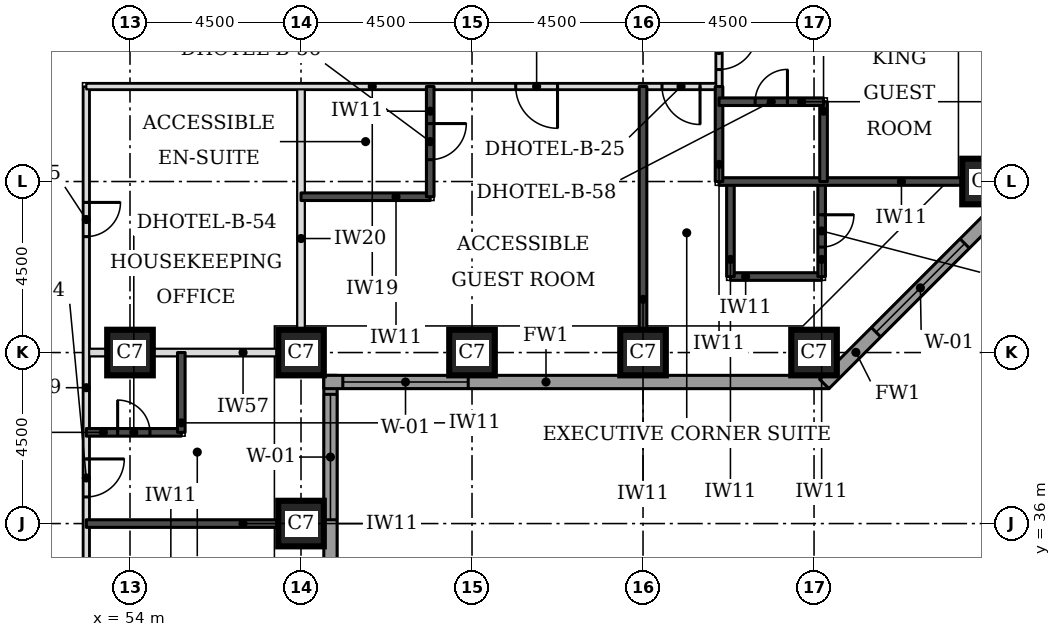
"""IFC4 building model, lengths in metres.
Left out: names, types, materials, properties, quantities, classifications, styles, units other than length and angle.
Written with IfcOpenShell. Run it as: python <this file> out.ifc"""

import sys

from ifc_helpers import new_model, si_unit, direction, frame, frame_2d, origin, origin_2d, place, context, subcontext, project, spatial, rectangle, extrude, element, fill, save


model = new_model("IFC4")
c1 = context("Model", 3, precision=1e-05, world=origin(), true_north=direction((0.0, 1.0)))
c2 = subcontext(c1, "Body", "Model", "MODEL_VIEW")
j1 = project(units=[si_unit("LENGTHUNIT", "METRE"), si_unit("PLANEANGLEUNIT", "RADIAN")], contexts=[c1])
p1 = place(None, origin())
s1 = spatial("IfcSite", under=j1, at=p1, CompositionType="ELEMENT")
p2 = place(p1, origin())
s2 = spatial("IfcBuilding", under=s1, at=p2, CompositionType="ELEMENT")
p3 = place(p2, frame((0.0, 0.0, 29.7)))
s3 = spatial("IfcBuildingStorey", under=s2, at=p3, CompositionType="ELEMENT", Elevation=29.7)
for number, where, z_axis, x_axis in (
    (1, (58.5, 36.0, 0.0), (0.0, 0.0, 1.0), (1.0, 0.0, 0.0)),
    (2, (54.0, 40.5, 0.0), (0.0, 0.0, 1.0), (1.0, 0.0, 0.0)),
    (3, (58.5, 40.5, 0.0), (0.0, 0.0, 1.0), (1.0, 0.0, 0.0)),
    (4, (63.0, 40.5, 0.0), (0.0, 0.0, 1.0), (1.0, 0.0, 0.0)),
    (5, (67.5, 40.5, 0.0), (0.0, 0.0, 1.0), (1.0, 0.0, 0.0)),
    (6, (72.0, 40.5, 0.0), (0.0, 0.0, 1.0), (1.0, 0.0, 0.0)),
    (7, (76.5, 45.0, 0.0), (0.0, 0.0, 1.0), (1.0, 0.0, 0.0)),
):
    element("IfcColumn", number, at=place(p3, frame(where, z_axis=z_axis, x_axis=x_axis)), inside=s3, PredefinedType="COLUMN", context=c2, shape_type="SweptSolid", body=[
        extrude(rectangle(XDim=1.2, YDim=1.2, at=origin_2d()), origin(), (0.0, 0.0, 1.0), 3.3),
    ])
p4 = place(p3, frame((59.275, 22.106, 0.0), z_axis=(0.0, 0.0, 1.0), x_axis=(0.0, 1.0, 0.0)))
e8 = element("IfcWall", 8, at=p4, inside=s3, PredefinedType="STANDARD", context=c2, shape_type="SweptSolid", body=[
    extrude(rectangle(XDim=17.793, YDim=0.35, at=frame_2d((8.897, 0.0))), origin(), (0.0, 0.0, 1.0), 3.055),
])
p5 = place(p4, frame((5.493, 0.0, 0.8)))
e9 = element("IfcOpeningElement", 9, at=p5, cuts=e8, PredefinedType="OPENING", context=c2, shape_type="SweptSolid", body=[
    extrude(rectangle(XDim=3.3, YDim=1.5, at=frame_2d((1.65, 0.75))), frame((0.0, 0.185, 0.0), z_axis=(0.0, -1.0, 0.0), x_axis=(1.0, 0.0, 0.0)), (0.0, 0.0, 1.0), 0.37),
])
p6 = place(p4, frame((13.993, 0.0, 0.8)))
e10 = element("IfcOpeningElement", 10, at=p6, cuts=e8, PredefinedType="OPENING", context=c2, shape_type="SweptSolid", body=[
    extrude(rectangle(XDim=3.3, YDim=1.5, at=frame_2d((1.65, 0.75))), frame((0.0, 0.185, 0.0), z_axis=(0.0, -1.0, 0.0), x_axis=(1.0, 0.0, 0.0)), (0.0, 0.0, 1.0), 0.37),
])
p7 = place(p3, frame((59.1, 39.725, 0.0), z_axis=(0.0, 0.0, 1.0), x_axis=(1.0, 0.0, 0.0)))
e11 = element("IfcWall", 11, at=p7, inside=s3, PredefinedType="STANDARD", context=c2, shape_type="SweptSolid", body=[
    extrude(rectangle(XDim=13.293, YDim=0.35, at=frame_2d((6.647, 0.0))), origin(), (0.0, 0.0, 1.0), 3.055),
])
p8 = place(p7, frame((0.5, 0.0, 0.8)))
e12 = element("IfcOpeningElement", 12, at=p8, cuts=e11, PredefinedType="OPENING", context=c2, shape_type="SweptSolid", body=[
    extrude(rectangle(XDim=3.3, YDim=1.5, at=frame_2d((1.65, 0.75))), frame((0.0, 0.185, 0.0), z_axis=(0.0, -1.0, 0.0), x_axis=(1.0, 0.0, 0.0)), (0.0, 0.0, 1.0), 0.37),
])
p9 = place(p3, frame((72.27, 39.674, 0.0), z_axis=(0.0, 0.0, 1.0), x_axis=(0.707106781187, 0.707106781187, 0.0)))
e13 = element("IfcWall", 13, at=p9, inside=s3, PredefinedType="STANDARD", context=c2, shape_type="SweptSolid", body=[
    extrude(rectangle(XDim=7.151, YDim=0.35, at=frame_2d((3.576, 0.0))), origin(), (0.0, 0.0, 1.0), 3.055),
])
p10 = place(p9, frame((1.926, 0.0, 0.8)))
e14 = element("IfcOpeningElement", 14, at=p10, cuts=e13, PredefinedType="OPENING", context=c2, shape_type="SweptSolid", body=[
    extrude(rectangle(XDim=3.3, YDim=1.5, at=frame_2d((1.65, 0.75))), frame((0.0, 0.185, 0.0), z_axis=(0.0, -1.0, 0.0), x_axis=(1.0, 0.0, 0.0)), (0.0, 0.0, 1.0), 0.37),
])
p11 = place(p3, frame((52.85, 40.5, 0.0), z_axis=(0.0, 0.0, 1.0), x_axis=(1.0, 0.0, 0.0)))
e15 = element("IfcWall", 15, at=p11, inside=s3, PredefinedType="PARTITIONING", context=c2, shape_type="SweptSolid", body=[
    extrude(rectangle(XDim=5.05, YDim=0.2, at=frame_2d((2.525, 0.0))), origin(), (0.0, 0.0, 1.0), 2.33),
])
p12 = place(p3, frame((58.5, 41.1, 0.0), z_axis=(0.0, 0.0, 1.0), x_axis=(0.0, 1.0, 0.0)))
e16 = element("IfcWall", 16, at=p12, inside=s3, PredefinedType="PARTITIONING", context=c2, shape_type="SweptSolid", body=[
    extrude(rectangle(XDim=6.4, YDim=0.2, at=frame_2d((3.2, 0.0))), origin(), (0.0, 0.0, 1.0), 3.08),
])
p13 = place(p3, frame((52.85, 23.65, 0.0), z_axis=(0.0, 0.0, 1.0), x_axis=(0.0, 1.0, 0.0)))
e17 = element("IfcWall", 17, at=p13, inside=s3, PredefinedType="PARTITIONING", context=c2, shape_type="SweptSolid", body=[
    extrude(rectangle(XDim=23.85, YDim=0.15, at=frame_2d((11.925, 0.0))), origin(), (0.0, 0.0, 1.0), 3.08),
])
p14 = place(p13, frame((1.65, 0.0, 0.0)))
e18 = element("IfcOpeningElement", 18, at=p14, cuts=e17, PredefinedType="OPENING", context=c2, shape_type="SweptSolid", body=[
    extrude(rectangle(XDim=1.0, YDim=2.1, at=frame_2d((0.5, 1.05))), frame((0.0, 0.085, 0.0), z_axis=(0.0, -1.0, 0.0), x_axis=(1.0, 0.0, 0.0)), (0.0, 0.0, 1.0), 0.17),
])
p15 = place(p13, frame((8.95, 0.0, 0.0)))
e19 = element("IfcOpeningElement", 19, at=p15, cuts=e17, PredefinedType="OPENING", context=c2, shape_type="SweptSolid", body=[
    extrude(rectangle(XDim=1.0, YDim=2.1, at=frame_2d((0.5, 1.05))), frame((0.0, 0.085, 0.0), z_axis=(0.0, -1.0, 0.0), x_axis=(1.0, 0.0, 0.0)), (0.0, 0.0, 1.0), 0.17),
])
p16 = place(p13, frame((13.05, 0.0, 0.0)))
e20 = element("IfcOpeningElement", 20, at=p16, cuts=e17, PredefinedType="OPENING", context=c2, shape_type="SweptSolid", body=[
    extrude(rectangle(XDim=1.0, YDim=2.1, at=frame_2d((0.5, 1.05))), frame((0.0, 0.085, 0.0), z_axis=(0.0, -1.0, 0.0), x_axis=(1.0, 0.0, 0.0)), (0.0, 0.0, 1.0), 0.17),
])
p17 = place(p13, frame((19.9, 0.0, 0.0)))
e21 = element("IfcOpeningElement", 21, at=p17, cuts=e17, PredefinedType="OPENING", context=c2, shape_type="SweptSolid", body=[
    extrude(rectangle(XDim=0.9, YDim=2.1, at=frame_2d((0.45, 1.05))), frame((0.0, 0.085, 0.0), z_axis=(0.0, -1.0, 0.0), x_axis=(1.0, 0.0, 0.0)), (0.0, 0.0, 1.0), 0.17),
])
p18 = place(p3, frame((52.85, 47.5, 0.0), z_axis=(0.0, 0.0, 1.0), x_axis=(1.0, 0.0, 0.0)))
e22 = element("IfcWall", 22, at=p18, inside=s3, PredefinedType="PARTITIONING", context=c2, shape_type="SweptSolid", body=[
    extrude(rectangle(XDim=16.65, YDim=0.15, at=frame_2d((8.325, 0.0))), origin(), (0.0, 0.0, 1.0), 3.08),
])
p19 = place(p18, frame((11.3, 0.0, 0.0)))
e23 = element("IfcOpeningElement", 23, at=p19, cuts=e22, PredefinedType="OPENING", context=c2, shape_type="SweptSolid", body=[
    extrude(rectangle(XDim=1.1, YDim=2.1, at=frame_2d((0.55, 1.05))), frame((0.0, 0.085, 0.0), z_axis=(0.0, -1.0, 0.0), x_axis=(1.0, 0.0, 0.0)), (0.0, 0.0, 1.0), 0.17),
])
p20 = place(p18, frame((15.15, 0.0, 0.0)))
e24 = element("IfcOpeningElement", 24, at=p20, cuts=e22, PredefinedType="OPENING", context=c2, shape_type="SweptSolid", body=[
    extrude(rectangle(XDim=1.0, YDim=2.1, at=frame_2d((0.5, 1.05))), frame((0.0, 0.085, 0.0), z_axis=(0.0, -1.0, 0.0), x_axis=(1.0, 0.0, 0.0)), (0.0, 0.0, 1.0), 0.17),
])
p21 = place(p3, frame((69.5, 47.5, 0.0), z_axis=(0.0, 0.0, 1.0), x_axis=(0.0, 1.0, 0.0)))
e25 = element("IfcWall", 25, at=p21, inside=s3, PredefinedType="PARTITIONING", context=c2, shape_type="SweptSolid", body=[
    extrude(rectangle(XDim=26.5, YDim=0.15, at=frame_2d((13.25, 0.0))), origin(), (0.0, 0.0, 1.0), 3.08),
])
p22 = place(p21, frame((24.95, 0.0, 0.0)))
e26 = element("IfcOpeningElement", 26, at=p22, cuts=e25, PredefinedType="OPENING", context=c2, shape_type="SweptSolid", body=[
    extrude(rectangle(XDim=1.0, YDim=2.1, at=frame_2d((0.5, 1.05))), frame((0.0, 0.085, 0.0), z_axis=(0.0, -1.0, 0.0), x_axis=(1.0, 0.0, 0.0)), (0.0, 0.0, 1.0), 0.17),
])
p23 = place(p21, frame((20.7, 0.0, 0.0)))
e27 = element("IfcOpeningElement", 27, at=p23, cuts=e25, PredefinedType="OPENING", context=c2, shape_type="SweptSolid", body=[
    extrude(rectangle(XDim=1.0, YDim=2.1, at=frame_2d((0.5, 1.05))), frame((0.0, 0.085, 0.0), z_axis=(0.0, -1.0, 0.0), x_axis=(1.0, 0.0, 0.0)), (0.0, 0.0, 1.0), 0.17),
])
p24 = place(p21, frame((18.55, 0.0, 0.0)))
e28 = element("IfcOpeningElement", 28, at=p24, cuts=e25, PredefinedType="OPENING", context=c2, shape_type="SweptSolid", body=[
    extrude(rectangle(XDim=1.0, YDim=2.1, at=frame_2d((0.5, 1.05))), frame((0.0, 0.085, 0.0), z_axis=(0.0, -1.0, 0.0), x_axis=(1.0, 0.0, 0.0)), (0.0, 0.0, 1.0), 0.17),
])
p25 = place(p21, frame((11.7, 0.0, 0.0)))
e29 = element("IfcOpeningElement", 29, at=p25, cuts=e25, PredefinedType="OPENING", context=c2, shape_type="SweptSolid", body=[
    extrude(rectangle(XDim=1.0, YDim=2.1, at=frame_2d((0.5, 1.05))), frame((0.0, 0.085, 0.0), z_axis=(0.0, -1.0, 0.0), x_axis=(1.0, 0.0, 0.0)), (0.0, 0.0, 1.0), 0.17),
])
p26 = place(p21, frame((7.65, 0.0, 0.0)))
e30 = element("IfcOpeningElement", 30, at=p26, cuts=e25, PredefinedType="OPENING", context=c2, shape_type="SweptSolid", body=[
    extrude(rectangle(XDim=1.1, YDim=2.1, at=frame_2d((0.55, 1.05))), frame((0.0, 0.085, 0.0), z_axis=(0.0, -1.0, 0.0), x_axis=(1.0, 0.0, 0.0)), (0.0, 0.0, 1.0), 0.17),
])
p27 = place(p21, frame((0.447, 0.0, 0.0)))
e31 = element("IfcOpeningElement", 31, at=p27, cuts=e25, PredefinedType="OPENING", context=c2, shape_type="SweptSolid", body=[
    extrude(rectangle(XDim=1.0, YDim=2.1, at=frame_2d((0.5, 1.05))), frame((0.0, 0.085, 0.0), z_axis=(0.0, -1.0, 0.0), x_axis=(1.0, 0.0, 0.0)), (0.0, 0.0, 1.0), 0.17),
])
p28 = place(p3, frame((52.85, 36.0, 0.0), z_axis=(0.0, 0.0, 1.0), x_axis=(1.0, 0.0, 0.0)))
e32 = element("IfcWall", 32, at=p28, inside=s3, PredefinedType="SOLIDWALL", context=c2, shape_type="SweptSolid", body=[
    extrude(rectangle(XDim=5.05, YDim=0.2, at=frame_2d((2.525, 0.0))), origin(), (0.0, 0.0, 1.0), 3.08),
])
p29 = place(p3, frame((52.85, 38.4, 0.0), z_axis=(0.0, 0.0, 1.0), x_axis=(1.0, 0.0, 0.0)))
e33 = element("IfcWall", 33, at=p29, inside=s3, PredefinedType="SOLIDWALL", context=c2, shape_type="SweptSolid", body=[
    extrude(rectangle(XDim=2.5, YDim=0.2, at=frame_2d((1.25, 0.0))), origin(), (0.0, 0.0, 1.0), 3.08),
])
p30 = place(p29, frame((0.825, 0.0, 0.0)))
e34 = element("IfcOpeningElement", 34, at=p30, cuts=e33, PredefinedType="OPENING", context=c2, shape_type="SweptSolid", body=[
    extrude(rectangle(XDim=0.85, YDim=2.1, at=frame_2d((0.425, 1.05))), frame((0.0, 0.11, 0.0), z_axis=(0.0, -1.0, 0.0), x_axis=(1.0, 0.0, 0.0)), (0.0, 0.0, 1.0), 0.22),
])
p31 = place(p3, frame((55.35, 38.4, 0.0), z_axis=(0.0, 0.0, 1.0), x_axis=(0.0, 1.0, 0.0)))
e35 = element("IfcWall", 35, at=p31, inside=s3, PredefinedType="SOLIDWALL", context=c2, shape_type="SweptSolid", body=[
    extrude(rectangle(XDim=2.1, YDim=0.2, at=frame_2d((1.05, 0.0))), origin(), (0.0, 0.0, 1.0), 3.08),
])
p32 = place(p3, frame((67.5, 41.1, 0.0), z_axis=(0.0, 0.0, 1.0), x_axis=(0.0, 1.0, 0.0)))
e36 = element("IfcWall", 36, at=p32, inside=s3, PredefinedType="SOLIDWALL", context=c2, shape_type="SweptSolid", body=[
    extrude(rectangle(XDim=6.4, YDim=0.2, at=frame_2d((3.2, 0.0))), origin(), (0.0, 0.0, 1.0), 3.08),
])
p33 = place(p3, frame((69.8, 42.5, 0.0), z_axis=(0.0, 0.0, 1.0), x_axis=(1.0, 0.0, 0.0)))
e37 = element("IfcWall", 37, at=p33, inside=s3, PredefinedType="SOLIDWALL", context=c2, shape_type="SweptSolid", body=[
    extrude(rectangle(XDim=2.4, YDim=0.2, at=frame_2d((1.2, 0.0))), origin(), (0.0, 0.0, 1.0), 3.08),
])
p34 = place(p3, frame((69.8, 42.5, 0.0), z_axis=(0.0, 0.0, 1.0), x_axis=(0.0, 1.0, 0.0)))
e38 = element("IfcWall", 38, at=p34, inside=s3, PredefinedType="SOLIDWALL", context=c2, shape_type="SweptSolid", body=[
    extrude(rectangle(XDim=2.5, YDim=0.2, at=frame_2d((1.25, 0.0))), origin(), (0.0, 0.0, 1.0), 3.08),
])
p35 = place(p3, frame((72.2, 42.5, 0.0), z_axis=(0.0, 0.0, 1.0), x_axis=(0.0, 1.0, 0.0)))
e39 = element("IfcWall", 39, at=p35, inside=s3, PredefinedType="SOLIDWALL", context=c2, shape_type="SweptSolid", body=[
    extrude(rectangle(XDim=2.5, YDim=0.2, at=frame_2d((1.25, 0.0))), origin(), (0.0, 0.0, 1.0), 3.08),
])
p36 = place(p35, frame((0.775, 0.0, 0.0)))
e40 = element("IfcOpeningElement", 40, at=p36, cuts=e39, PredefinedType="OPENING", context=c2, shape_type="SweptSolid", body=[
    extrude(rectangle(XDim=0.85, YDim=2.1, at=frame_2d((0.425, 1.05))), frame((0.0, 0.11, 0.0), z_axis=(0.0, -1.0, 0.0), x_axis=(1.0, 0.0, 0.0)), (0.0, 0.0, 1.0), 0.22),
])
p37 = place(p3, frame((58.5, 44.6, 0.0), z_axis=(0.0, 0.0, 1.0), x_axis=(1.0, 0.0, 0.0)))
e41 = element("IfcWall", 41, at=p37, inside=s3, PredefinedType="SOLIDWALL", context=c2, shape_type="SweptSolid", body=[
    extrude(rectangle(XDim=3.4, YDim=0.2, at=frame_2d((1.7, 0.0))), origin(), (0.0, 0.0, 1.0), 3.08),
])
p38 = place(p3, frame((61.9, 44.6, 0.0), z_axis=(0.0, 0.0, 1.0), x_axis=(0.0, 1.0, 0.0)))
e42 = element("IfcWall", 42, at=p38, inside=s3, PredefinedType="SOLIDWALL", context=c2, shape_type="SweptSolid", body=[
    extrude(rectangle(XDim=2.9, YDim=0.2, at=frame_2d((1.45, 0.0))), origin(), (0.0, 0.0, 1.0), 3.08),
])
p39 = place(p38, frame((0.975, 0.0, 0.0)))
e43 = element("IfcOpeningElement", 43, at=p39, cuts=e42, PredefinedType="OPENING", context=c2, shape_type="SweptSolid", body=[
    extrude(rectangle(XDim=0.95, YDim=2.1, at=frame_2d((0.475, 1.05))), frame((0.0, 0.11, 0.0), z_axis=(0.0, -1.0, 0.0), x_axis=(1.0, 0.0, 0.0)), (0.0, 0.0, 1.0), 0.22),
])
p40 = place(p3, frame((69.5, 45.0, 0.0), z_axis=(0.0, 0.0, 1.0), x_axis=(1.0, 0.0, 0.0)))
e44 = element("IfcWall", 44, at=p40, inside=s3, PredefinedType="SOLIDWALL", context=c2, shape_type="SweptSolid", body=[
    extrude(rectangle(XDim=6.4, YDim=0.2, at=frame_2d((3.2, 0.0))), origin(), (0.0, 0.0, 1.0), 3.08),
])
p41 = place(p3, frame((69.5, 45.0, 0.0), z_axis=(0.0, 0.0, 1.0), x_axis=(0.0, 1.0, 0.0)))
e45 = element("IfcWall", 45, at=p41, inside=s3, PredefinedType="SOLIDWALL", context=c2, shape_type="SweptSolid", body=[
    extrude(rectangle(XDim=2.5, YDim=0.2, at=frame_2d((1.25, 0.0))), origin(), (0.0, 0.0, 1.0), 3.08),
])
p42 = place(p3, frame((72.25, 45.0, 0.0), z_axis=(0.0, 0.0, 1.0), x_axis=(0.0, 1.0, 0.0)))
e46 = element("IfcWall", 46, at=p42, inside=s3, PredefinedType="SOLIDWALL", context=c2, shape_type="SweptSolid", body=[
    extrude(rectangle(XDim=2.1, YDim=0.2, at=frame_2d((1.05, 0.0))), origin(), (0.0, 0.0, 1.0), 3.08),
])
p43 = place(p3, frame((69.5, 47.1, 0.0), z_axis=(0.0, 0.0, 1.0), x_axis=(1.0, 0.0, 0.0)))
e47 = element("IfcWall", 47, at=p43, inside=s3, PredefinedType="SOLIDWALL", context=c2, shape_type="SweptSolid", body=[
    extrude(rectangle(XDim=2.75, YDim=0.2, at=frame_2d((1.375, 0.0))), origin(), (0.0, 0.0, 1.0), 3.08),
])
p44 = place(p43, frame((0.95, 0.0, 0.0)))
e48 = element("IfcOpeningElement", 48, at=p44, cuts=e47, PredefinedType="OPENING", context=c2, shape_type="SweptSolid", body=[
    extrude(rectangle(XDim=0.85, YDim=2.1, at=frame_2d((0.425, 1.05))), frame((0.0, 0.11, 0.0), z_axis=(0.0, -1.0, 0.0), x_axis=(1.0, 0.0, 0.0)), (0.0, 0.0, 1.0), 0.22),
])
p45 = place(p6, origin())
e49 = element("IfcWindow", 49, at=p45, inside=s3, PartitioningType="SINGLE_PANEL", PredefinedType="WINDOW", context=c2, shape_type="SweptSolid", body=[
    extrude(rectangle(XDim=3.3, YDim=1.5, at=frame_2d((1.65, 0.75))), frame((0.0, 0.085, 0.0), z_axis=(0.0, -1.0, 0.0), x_axis=(1.0, 0.0, 0.0)), (0.0, 0.0, 1.0), 0.06),
])
fill(e10, e49)
p46 = place(p8, origin())
e50 = element("IfcWindow", 50, at=p46, inside=s3, PartitioningType="SINGLE_PANEL", PredefinedType="WINDOW", context=c2, shape_type="SweptSolid", body=[
    extrude(rectangle(XDim=3.3, YDim=1.5, at=frame_2d((1.65, 0.75))), frame((0.0, 0.085, 0.0), z_axis=(0.0, -1.0, 0.0), x_axis=(1.0, 0.0, 0.0)), (0.0, 0.0, 1.0), 0.06),
])
fill(e12, e50)
p47 = place(p10, origin())
e51 = element("IfcWindow", 51, at=p47, inside=s3, PartitioningType="SINGLE_PANEL", PredefinedType="WINDOW", context=c2, shape_type="SweptSolid", body=[
    extrude(rectangle(XDim=3.3, YDim=1.5, at=frame_2d((1.65, 0.75))), frame((0.0, 0.085, 0.0), z_axis=(0.0, -1.0, 0.0), x_axis=(1.0, 0.0, 0.0)), (0.0, 0.0, 1.0), 0.06),
])
fill(e14, e51)
p48 = place(p16, frame((1.0, 0.0, 0.0), z_axis=(0.0, 0.0, 1.0), x_axis=(-1.0, 0.0, 0.0)))
e52 = element("IfcDoor", 52, at=p48, inside=s3, OperationType="SINGLE_SWING_LEFT", PredefinedType="DOOR", context=c2, shape_type="SweptSolid", body=[
    extrude(rectangle(XDim=1.0, YDim=2.1, at=frame_2d((0.5, 1.05))), frame((0.0, 0.025, 0.0), z_axis=(0.0, -1.0, 0.0), x_axis=(1.0, 0.0, 0.0)), (0.0, 0.0, 1.0), 0.05),
])
fill(e20, e52)
p49 = place(p30, origin())
e53 = element("IfcDoor", 53, at=p49, inside=s3, OperationType="SINGLE_SWING_LEFT", PredefinedType="DOOR", context=c2, shape_type="SweptSolid", body=[
    extrude(rectangle(XDim=0.85, YDim=2.1, at=frame_2d((0.425, 1.05))), frame((0.0, 0.025, 0.0), z_axis=(0.0, -1.0, 0.0), x_axis=(1.0, 0.0, 0.0)), (0.0, 0.0, 1.0), 0.05),
])
fill(e34, e53)
p50 = place(p27, frame((1.0, 0.0, 0.0), z_axis=(0.0, 0.0, 1.0), x_axis=(-1.0, 0.0, 0.0)))
e54 = element("IfcDoor", 54, at=p50, inside=s3, OperationType="SINGLE_SWING_LEFT", PredefinedType="DOOR", context=c2, shape_type="SweptSolid", body=[
    extrude(rectangle(XDim=1.0, YDim=2.1, at=frame_2d((0.5, 1.05))), frame((0.0, 0.025, 0.0), z_axis=(0.0, -1.0, 0.0), x_axis=(1.0, 0.0, 0.0)), (0.0, 0.0, 1.0), 0.05),
])
fill(e31, e54)
p51 = place(p44, origin())
e55 = element("IfcDoor", 55, at=p51, inside=s3, OperationType="SINGLE_SWING_RIGHT", PredefinedType="DOOR", context=c2, shape_type="SweptSolid", body=[
    extrude(rectangle(XDim=0.85, YDim=2.1, at=frame_2d((0.425, 1.05))), frame((0.0, 0.025, 0.0), z_axis=(0.0, -1.0, 0.0), x_axis=(1.0, 0.0, 0.0)), (0.0, 0.0, 1.0), 0.05),
])
fill(e48, e55)
p52 = place(p19, frame((1.1, 0.0, 0.0), z_axis=(0.0, 0.0, 1.0), x_axis=(-1.0, 0.0, 0.0)))
e56 = element("IfcDoor", 56, at=p52, inside=s3, OperationType="SINGLE_SWING_LEFT", PredefinedType="DOOR", context=c2, shape_type="SweptSolid", body=[
    extrude(rectangle(XDim=1.1, YDim=2.1, at=frame_2d((0.55, 1.05))), frame((0.0, 0.025, 0.0), z_axis=(0.0, -1.0, 0.0), x_axis=(1.0, 0.0, 0.0)), (0.0, 0.0, 1.0), 0.05),
])
fill(e23, e56)
p53 = place(p39, frame((0.95, 0.0, 0.0), z_axis=(0.0, 0.0, 1.0), x_axis=(-1.0, 0.0, 0.0)))
e57 = element("IfcDoor", 57, at=p53, inside=s3, OperationType="SINGLE_SWING_LEFT", PredefinedType="DOOR", context=c2, shape_type="SweptSolid", body=[
    extrude(rectangle(XDim=0.95, YDim=2.1, at=frame_2d((0.475, 1.05))), frame((0.0, 0.025, 0.0), z_axis=(0.0, -1.0, 0.0), x_axis=(1.0, 0.0, 0.0)), (0.0, 0.0, 1.0), 0.05),
])
fill(e43, e57)
p54 = place(p20, frame((1.0, 0.0, 0.0), z_axis=(0.0, 0.0, 1.0), x_axis=(-1.0, 0.0, 0.0)))
e58 = element("IfcDoor", 58, at=p54, inside=s3, OperationType="SINGLE_SWING_LEFT", PredefinedType="DOOR", context=c2, shape_type="SweptSolid", body=[
    extrude(rectangle(XDim=1.0, YDim=2.1, at=frame_2d((0.5, 1.05))), frame((0.0, 0.025, 0.0), z_axis=(0.0, -1.0, 0.0), x_axis=(1.0, 0.0, 0.0)), (0.0, 0.0, 1.0), 0.05),
])
fill(e24, e58)
p55 = place(p36, frame((0.85, 0.0, 0.0), z_axis=(0.0, 0.0, 1.0), x_axis=(-1.0, 0.0, 0.0)))
e59 = element("IfcDoor", 59, at=p55, inside=s3, OperationType="SINGLE_SWING_LEFT", PredefinedType="DOOR", context=c2, shape_type="SweptSolid", body=[
    extrude(rectangle(XDim=0.85, YDim=2.1, at=frame_2d((0.425, 1.05))), frame((0.0, 0.025, 0.0), z_axis=(0.0, -1.0, 0.0), x_axis=(1.0, 0.0, 0.0)), (0.0, 0.0, 1.0), 0.05),
])
fill(e40, e59)
p56 = place(p17, frame((0.9, 0.0, 0.0), z_axis=(0.0, 0.0, 1.0), x_axis=(-1.0, 0.0, 0.0)))
e60 = element("IfcDoor", 60, at=p56, inside=s3, OperationType="SINGLE_SWING_LEFT", PredefinedType="DOOR", context=c2, shape_type="SweptSolid", body=[
    extrude(rectangle(XDim=0.9, YDim=2.1, at=frame_2d((0.45, 1.05))), frame((0.0, 0.025, 0.0), z_axis=(0.0, -1.0, 0.0), x_axis=(1.0, 0.0, 0.0)), (0.0, 0.0, 1.0), 0.05),
])
fill(e21, e60)
save(model, sys.argv[1])
